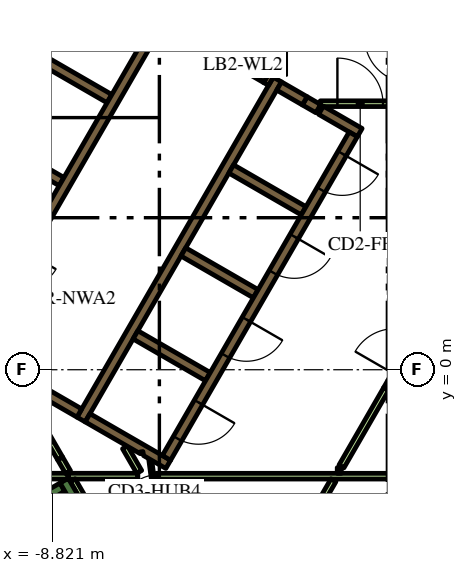
"""IFC4 building model, lengths in metres.
Left out: names, types, materials, properties, quantities, classifications, styles, units other than length and angle.
Written with IfcOpenShell. Run it as: python <this file> out.ifc"""

import sys

from ifc_helpers import new_model, si_unit, direction, frame, frame_2d, origin, place, context, subcontext, project, spatial, polyline, rectangle, outline, extrude, element, fill, save


model = new_model("IFC4")
c1 = context("Model", 3, precision=1e-05, world=origin(), true_north=direction((0.0, 1.0)))
c2 = subcontext(c1, "Body", "Model", "MODEL_VIEW")
j1 = project(units=[si_unit("LENGTHUNIT", "METRE"), si_unit("PLANEANGLEUNIT", "RADIAN")], contexts=[c1])
p1 = place(None, origin())
s1 = spatial("IfcSite", under=j1, at=p1, CompositionType="ELEMENT")
p2 = place(p1, origin())
s2 = spatial("IfcBuilding", under=s1, at=p2, CompositionType="ELEMENT")
p3 = place(p2, frame((0.0, 0.0, 130.5)))
s3 = spatial("IfcBuildingStorey", under=s2, at=p3, CompositionType="ELEMENT", Elevation=130.5)
p4 = place(p3, frame((-14.268, 0.387, 0.0), z_axis=(0.0, 0.0, 1.0), x_axis=(0.499994617707, 0.866028511231, 0.0)))
e1 = element("IfcWall", 1, at=p4, inside=s3, PredefinedType="SOLIDWALL", context=c2, shape_type="SweptSolid", body=[
    extrude(rectangle(XDim=18.817, YDim=0.9, at=frame_2d((9.409, 0.0))), origin(), (0.0, 0.0, 1.0), 3.9),
])
p5 = place(p3, frame((-14.44, -6.49, 0.0), z_axis=(0.0, 0.0, 1.0), x_axis=(0.866022966069, 0.500004222222, 0.0)))
e2 = element("IfcWall", 2, at=p5, inside=s3, PredefinedType="SOLIDWALL", context=c2, shape_type="SweptSolid", body=[
    extrude(rectangle(XDim=6.8, YDim=0.25, at=frame_2d((3.4, 0.0))), origin(), (0.0, 0.0, 1.0), 3.9),
])
p6 = place(p3, frame((-8.163, -3.511, 0.0), z_axis=(0.0, 0.0, 1.0), x_axis=(-0.500206266495, 0.865906283012, 0.0)))
e3 = element("IfcWall", 3, at=p6, inside=s3, PredefinedType="SOLIDWALL", context=c2, shape_type="SweptSolid", body=[
    extrude(rectangle(XDim=0.684, YDim=0.25, at=frame_2d((0.342, 0.0))), origin(), (0.0, 0.0, 1.0), 3.9),
])
p7 = place(p3, frame((-8.06, -1.311, 0.0), z_axis=(0.0, 0.0, 1.0), x_axis=(0.50000273126, 0.866023826885, 0.0)))
e4 = element("IfcWall", 4, at=p7, inside=s3, PredefinedType="SOLIDWALL", context=c2, shape_type="SweptSolid", body=[
    extrude(rectangle(XDim=10.33, YDim=0.25, at=frame_2d((5.165, 0.0))), origin(), (0.0, 0.0, 1.0), 3.9),
])
p8 = place(p3, frame((-1.819, 6.87, 0.0), z_axis=(0.0, 0.0, 1.0), x_axis=(-0.866294599386, 0.499533449405, 0.0)))
e5 = element("IfcWall", 5, at=p8, inside=s3, PredefinedType="SOLIDWALL", context=c2, shape_type="SweptSolid", body=[
    extrude(rectangle(XDim=0.41, YDim=0.25, at=frame_2d((0.205, 0.0))), origin(), (0.0, 0.0, 1.0), 3.9),
])
p9 = place(p3, frame((-2.849, 7.465, 0.0), z_axis=(0.0, 0.0, 1.0), x_axis=(0.865955664968, -0.500120771724, 0.0)))
e6 = element("IfcWall", 6, at=p9, inside=s3, PredefinedType="SOLIDWALL", context=c2, shape_type="SweptSolid", body=[
    extrude(rectangle(XDim=0.778, YDim=0.25, at=frame_2d((0.389, 0.0))), origin(), (0.0, 0.0, 1.0), 3.9),
])
p10 = place(p3, frame((-0.728, 6.24, 0.0), z_axis=(0.0, 0.0, 1.0), x_axis=(-0.866002680491, 0.500039355833, 0.0)))
e7 = element("IfcWall", 7, at=p10, inside=s3, PredefinedType="SOLIDWALL", context=c2, shape_type="SweptSolid", body=[
    extrude(rectangle(XDim=1.178, YDim=0.25, at=frame_2d((0.589, 0.0))), origin(), (0.0, 0.0, 1.0), 3.9),
])
for number, where, z_axis, x_axis in (
    (8, (-2.204, 4.182, 0.0), (0.0, 0.0, 1.0), (-0.866, 0.5, 0.0)),
    (9, (-5.369, 3.1, 0.0), (0.0, 0.0, 1.0), (0.866, -0.5, 0.0)),
    (10, (-4.724, -0.182, 0.0), (0.0, 0.0, 1.0), (-0.866, 0.5, 0.0)),
):
    element("IfcWall", number, at=place(p3, frame(where, z_axis=z_axis, x_axis=x_axis)), inside=s3, PredefinedType="SOLIDWALL", context=c2, shape_type="SweptSolid", body=[
        extrude(rectangle(XDim=2.2, YDim=0.25, at=frame_2d((1.1, 0.0))), origin(), (0.0, 0.0, 1.0), 3.9),
    ])
p11 = place(p3, origin())
e11 = element("IfcWall", 11, at=p11, inside=s3, PredefinedType="SOLIDWALL", context=c2, shape_type="SweptSolid", body=[
    extrude(outline(polyline([(-5.922, -2.257), (-5.922, -2.257), (-5.705, -2.382), (-5.83, -2.598), (-6.418, -2.258), (-6.433, -2.153), (-6.433, -2.153), (-6.433, -2.153), (-6.508, -2.163), (-6.508, -2.163), (-6.508, -2.163), (-6.501, -2.21), (-7.952, -1.373), (-7.827, -1.156), (-5.922, -2.257)])), origin(), (0.0, 0.0, 1.0), 3.9),
])
p12 = place(p3, frame((-9.265, -0.471, 0.0), z_axis=(0.0, 0.0, 1.0), x_axis=(0.865954634268, -0.500122556369, 0.0)))
e12 = element("IfcWall", 12, at=p12, inside=s3, PredefinedType="SOLIDWALL", context=c2, shape_type="SweptSolid", body=[
    extrude(rectangle(XDim=1.338, YDim=0.25, at=frame_2d((0.669, 0.0))), origin(), (0.0, 0.0, 1.0), 3.9),
])
e13 = element("IfcWall", 13, at=p11, inside=s3, PredefinedType="SOLIDWALL", context=c2, shape_type="SweptSolid", body=[
    extrude(outline(polyline([(-3.128, 7.481), (-3.259, 7.557), (-3.134, 7.773), (-3.003, 7.698), (-3.128, 7.481)])), origin(), (0.0, 0.0, 1.0), 3.9),
])
for number, where, z_axis, x_axis in (
    (14, (-8.574, 4.95, 0.0), (0.0, 0.0, 1.0), (-0.866, 0.5, 0.0)),
    (15, (-7.314, 7.132, 0.0), (0.0, 0.0, 1.0), (-0.866, 0.5, 0.0)),
):
    element("IfcWall", number, at=place(p3, frame(where, z_axis=z_axis, x_axis=x_axis)), inside=s3, PredefinedType="SOLIDWALL", context=c2, shape_type="SweptSolid", body=[
        extrude(rectangle(XDim=2.2, YDim=0.25, at=frame_2d((1.1, 0.0))), origin(), (0.0, 0.0, 1.0), 3.9),
    ])
p13 = place(p3, frame((-7.959, 10.415, 0.0), z_axis=(0.0, 0.0, 1.0), x_axis=(0.866020958405, -0.500007699544, 0.0)))
e16 = element("IfcWall", 16, at=p13, inside=s3, PredefinedType="SOLIDWALL", context=c2, shape_type="SweptSolid", body=[
    extrude(rectangle(XDim=4.1, YDim=0.25, at=frame_2d((2.05, 0.0))), origin(), (0.0, 0.0, 1.0), 3.9),
])
p14 = place(p3, frame((-8.395, -2.8, 0.0), z_axis=(0.0, 0.0, 1.0), x_axis=(1.0, 0.0, 0.0)))
e17 = element("IfcWall", 17, at=p14, inside=s3, PredefinedType="PARTITIONING", context=c2, shape_type="SweptSolid", body=[
    extrude(rectangle(XDim=1.828, YDim=0.15, at=frame_2d((0.914, 0.0))), origin(), (0.0, 0.0, 1.0), 2.6),
])
p15 = place(p3, frame((-11.115, -2.8, 0.0), z_axis=(0.0, 0.0, 1.0), x_axis=(1.0, 0.0, 0.0)))
e18 = element("IfcWall", 18, at=p15, inside=s3, PredefinedType="PARTITIONING", context=c2, shape_type="SweptSolid", body=[
    extrude(rectangle(XDim=2.708, YDim=0.15, at=frame_2d((1.354, 0.0))), origin(), (0.0, 0.0, 1.0), 2.6),
])
p16 = place(p3, frame((-6.531, -2.689, 0.0), z_axis=(0.0, 0.0, 1.0), x_axis=(-0.499967446111, 0.866044197965, 0.0)))
e19 = element("IfcWall", 19, at=p16, inside=s3, PredefinedType="PARTITIONING", context=c2, shape_type="SweptSolid", body=[
    extrude(rectangle(XDim=0.748, YDim=0.15, at=frame_2d((0.374, 0.0))), origin(), (0.0, 0.0, 1.0), 2.6),
])
p17 = place(p3, frame((-7.99, -3.412, 0.0), z_axis=(0.0, 0.0, 1.0), x_axis=(-0.500193841991, 0.86591346013, 0.0)))
e20 = element("IfcWall", 20, at=p17, inside=s3, PredefinedType="PARTITIONING", context=c2, shape_type="SweptSolid", body=[
    extrude(rectangle(XDim=0.583, YDim=0.15, at=frame_2d((0.292, 0.0))), origin(), (0.0, 0.0, 1.0), 2.6),
])
p18 = place(p3, frame((-8.612, -2.333, 0.0), z_axis=(0.0, 0.0, 1.0), x_axis=(0.500248216681, -0.86588204838, 0.0)))
e21 = element("IfcWall", 21, at=p18, inside=s3, PredefinedType="PARTITIONING", context=c2, shape_type="SweptSolid", body=[
    extrude(rectangle(XDim=0.415, YDim=0.15, at=frame_2d((0.208, 0.0))), origin(), (0.0, 0.0, 1.0), 2.6),
])
p19 = place(p3, frame((-6.086, -2.801, 0.0), z_axis=(0.0, 0.0, 1.0), x_axis=(1.0, 0.0, 0.0)))
e22 = element("IfcWall", 22, at=p19, inside=s3, PredefinedType="PARTITIONING", context=c2, shape_type="SweptSolid", body=[
    extrude(rectangle(XDim=7.524, YDim=0.15, at=frame_2d((3.762, 0.0))), origin(), (0.0, 0.0, 1.0), 2.6),
])
p20 = place(p3, frame((-1.887, -3.718, 0.0), z_axis=(0.0, 0.0, 1.0), x_axis=(0.499842898591, 0.866116087328, 0.0)))
e23 = element("IfcWall", 23, at=p20, inside=s3, PredefinedType="PARTITIONING", context=c2, shape_type="SweptSolid", body=[
    extrude(rectangle(XDim=0.936, YDim=0.15, at=frame_2d((0.468, 0.0))), origin(), (0.0, 0.0, 1.0), 2.6),
])
p21 = place(p3, frame((-1.212, -2.651, 0.0), z_axis=(0.0, 0.0, 1.0), x_axis=(-1.0, 0.0, 0.0)))
e24 = element("IfcWall", 24, at=p21, inside=s3, PredefinedType="PARTITIONING", context=c2, shape_type="SweptSolid", body=[
    extrude(rectangle(XDim=0.108, YDim=0.15, at=frame_2d((0.054, 0.0))), origin(), (0.0, 0.0, 1.0), 2.6),
])
p22 = place(p3, frame((-1.208, -2.544, 0.0), z_axis=(0.0, 0.0, 1.0), x_axis=(0.499995339376, 0.86602809458, 0.0)))
e25 = element("IfcWall", 25, at=p22, inside=s3, PredefinedType="PARTITIONING", context=c2, shape_type="SweptSolid", body=[
    extrude(rectangle(XDim=2.349, YDim=0.15, at=frame_2d((1.175, 0.0))), origin(), (0.0, 0.0, 1.0), 2.6),
])
p23 = place(p3, frame((-6.008, 9.144, 0.0), z_axis=(0.0, 0.0, 1.0), x_axis=(-0.500006956611, -0.866021387346, 0.0)))
e26 = element("IfcWall", 26, at=p23, inside=s3, PredefinedType="SOLIDWALL", context=c2, shape_type="SweptSolid", body=[
    extrude(rectangle(XDim=9.83, YDim=0.25, at=frame_2d((4.915, 0.0))), origin(), (0.0, 0.0, 1.0), 3.9),
])
p24 = place(p23, frame((6.985, 0.0, 0.0)))
e27 = element("IfcOpeningElement", 27, at=p24, cuts=e26, PredefinedType="OPENING", context=c2, shape_type="SweptSolid", body=[
    extrude(rectangle(XDim=0.9, YDim=2.1, at=frame_2d((0.45, 1.05))), frame((0.0, 0.135, 0.0), z_axis=(0.0, -1.0, 0.0), x_axis=(1.0, 0.0, 0.0)), (0.0, 0.0, 1.0), 0.27),
])
p25 = place(p3, frame((-0.898, 6.194, 0.0), z_axis=(0.0, 0.0, 1.0), x_axis=(-0.499996202215, -0.866027596426, 0.0)))
e28 = element("IfcWall", 28, at=p25, inside=s3, PredefinedType="SOLIDWALL", context=c2, shape_type="SweptSolid", body=[
    extrude(rectangle(XDim=9.83, YDim=0.25, at=frame_2d((4.915, 0.0))), origin(), (0.0, 0.0, 1.0), 3.9),
])
p26 = place(p25, frame((0.585, 0.0, 0.0)))
e29 = element("IfcOpeningElement", 29, at=p26, cuts=e28, PredefinedType="OPENING", context=c2, shape_type="SweptSolid", body=[
    extrude(rectangle(XDim=1.1, YDim=2.1, at=frame_2d((0.55, 1.05))), frame((0.0, 0.135, 0.0), z_axis=(0.0, -1.0, 0.0), x_axis=(1.0, 0.0, 0.0)), (0.0, 0.0, 1.0), 0.27),
])
p27 = place(p25, frame((3.105, 0.0, 0.0)))
e30 = element("IfcOpeningElement", 30, at=p27, cuts=e28, PredefinedType="OPENING", context=c2, shape_type="SweptSolid", body=[
    extrude(rectangle(XDim=1.1, YDim=2.1, at=frame_2d((0.55, 1.05))), frame((0.0, 0.135, 0.0), z_axis=(0.0, -1.0, 0.0), x_axis=(1.0, 0.0, 0.0)), (0.0, 0.0, 1.0), 0.27),
])
p28 = place(p25, frame((5.625, 0.0, 0.0)))
e31 = element("IfcOpeningElement", 31, at=p28, cuts=e28, PredefinedType="OPENING", context=c2, shape_type="SweptSolid", body=[
    extrude(rectangle(XDim=1.1, YDim=2.1, at=frame_2d((0.55, 1.05))), frame((0.0, 0.135, 0.0), z_axis=(0.0, -1.0, 0.0), x_axis=(1.0, 0.0, 0.0)), (0.0, 0.0, 1.0), 0.27),
])
p29 = place(p25, frame((8.145, 0.0, 0.0)))
e32 = element("IfcOpeningElement", 32, at=p29, cuts=e28, PredefinedType="OPENING", context=c2, shape_type="SweptSolid", body=[
    extrude(rectangle(XDim=1.1, YDim=2.1, at=frame_2d((0.55, 1.05))), frame((0.0, 0.135, 0.0), z_axis=(0.0, -1.0, 0.0), x_axis=(1.0, 0.0, 0.0)), (0.0, 0.0, 1.0), 0.27),
])
p30 = place(p3, frame((-1.765, 7.0, 0.0), z_axis=(0.0, 0.0, 1.0), x_axis=(1.0, 0.0, 0.0)))
e33 = element("IfcWall", 33, at=p30, inside=s3, PredefinedType="PARTITIONING", context=c2, shape_type="SweptSolid", body=[
    extrude(rectangle(XDim=2.1, YDim=0.15, at=frame_2d((1.05, 0.0))), origin(), (0.0, 0.0, 1.0), 2.6),
])
p31 = place(p30, frame((0.45, 0.0, 0.0)))
e34 = element("IfcOpeningElement", 34, at=p31, cuts=e33, PredefinedType="OPENING", context=c2, shape_type="SweptSolid", body=[
    extrude(rectangle(XDim=1.2, YDim=2.1, at=frame_2d((0.6, 1.05))), frame((0.0, 0.085, 0.0), z_axis=(0.0, -1.0, 0.0), x_axis=(1.0, 0.0, 0.0)), (0.0, 0.0, 1.0), 0.17),
])
p32 = place(p3, frame((-0.034, -0.509, 0.0), z_axis=(0.0, 0.0, 1.0), x_axis=(0.49994051562, 0.866059744384, 0.0)))
e35 = element("IfcWall", 35, at=p32, inside=s3, PredefinedType="PARTITIONING", context=c2, shape_type="SweptSolid", body=[
    extrude(rectangle(XDim=2.1, YDim=0.15, at=frame_2d((1.05, 0.0))), origin(), (0.0, 0.0, 1.0), 2.6),
])
p33 = place(p32, frame((0.45, 0.0, 0.0)))
e36 = element("IfcOpeningElement", 36, at=p33, cuts=e35, PredefinedType="OPENING", context=c2, shape_type="SweptSolid", body=[
    extrude(rectangle(XDim=1.2, YDim=2.1, at=frame_2d((0.6, 1.05))), frame((0.0, 0.085, 0.0), z_axis=(0.0, -1.0, 0.0), x_axis=(1.0, 0.0, 0.0)), (0.0, 0.0, 1.0), 0.17),
])
p34 = place(p3, frame((-5.995, -4.213, 0.0), z_axis=(0.0, 0.0, 1.0), x_axis=(-0.132072335448, 0.991240081014, 0.0)))
e37 = element("IfcWall", 37, at=p34, inside=s3, PredefinedType="PARTITIONING", context=c2, shape_type="SweptSolid", body=[
    extrude(rectangle(XDim=2.1, YDim=0.076, at=frame_2d((1.05, 0.0))), origin(), (0.0, 0.0, 1.0), 2.6),
])
p35 = place(p34, frame((0.55, 0.0, 0.0)))
e38 = element("IfcOpeningElement", 38, at=p35, cuts=e37, PredefinedType="OPENING", context=c2, shape_type="SweptSolid", body=[
    extrude(rectangle(XDim=0.9, YDim=2.1, at=frame_2d((0.45, 1.05))), frame((0.0, 0.048, 0.0), z_axis=(0.0, -1.0, 0.0), x_axis=(1.0, 0.0, 0.0)), (0.0, 0.0, 1.0), 0.096),
])
p36 = place(p3, frame((-4.409, 8.365, 0.0), z_axis=(0.0, 0.0, 1.0), x_axis=(0.866034573852, -0.49998411664, 0.0)))
e39 = element("IfcWall", 39, at=p36, inside=s3, PredefinedType="SOLIDWALL", context=c2, shape_type="SweptSolid", body=[
    extrude(rectangle(XDim=1.4, YDim=0.25, at=frame_2d((0.7, 0.0))), origin(), (0.0, 0.0, 1.0), 3.9),
])
p37 = place(p36, frame((0.1, 0.0, 0.0)))
e40 = element("IfcOpeningElement", 40, at=p37, cuts=e39, PredefinedType="OPENING", context=c2, shape_type="SweptSolid", body=[
    extrude(rectangle(XDim=1.2, YDim=2.1, at=frame_2d((0.6, 1.05))), frame((0.0, 0.135, 0.0), z_axis=(0.0, -1.0, 0.0), x_axis=(1.0, 0.0, 0.0)), (0.0, 0.0, 1.0), 0.27),
])
p38 = place(p3, frame((-8.612, -2.333, 0.0), z_axis=(0.0, 0.0, 1.0), x_axis=(-0.499961193289, 0.866047807691, 0.0)))
e41 = element("IfcWall", 41, at=p38, inside=s3, PredefinedType="PARTITIONING", context=c2, shape_type="SweptSolid", body=[
    extrude(rectangle(XDim=1.8, YDim=0.15, at=frame_2d((0.9, 0.0))), origin(), (0.0, 0.0, 1.0), 2.6),
])
p39 = place(p38, frame((0.45, 0.0, 0.0)))
e42 = element("IfcOpeningElement", 42, at=p39, cuts=e41, PredefinedType="OPENING", context=c2, shape_type="SweptSolid", body=[
    extrude(rectangle(XDim=0.9, YDim=2.1, at=frame_2d((0.45, 1.05))), frame((0.0, 0.085, 0.0), z_axis=(0.0, -1.0, 0.0), x_axis=(1.0, 0.0, 0.0)), (0.0, 0.0, 1.0), 0.17),
])
p40 = place(p3, frame((-19.081, -3.9, 0.0), z_axis=(0.0, 0.0, 1.0), x_axis=(0.499998313975, 0.866026377209, 0.0)))
e43 = element("IfcWall", 43, at=p40, inside=s3, PredefinedType="PARTITIONING", context=c2, shape_type="SweptSolid", body=[
    extrude(rectangle(XDim=25.766, YDim=0.15, at=frame_2d((12.883, 0.0))), origin(), (0.0, 0.0, 1.0), 2.6),
])
p41 = place(p40, frame((24.141, 0.0, 0.0)))
e44 = element("IfcOpeningElement", 44, at=p41, cuts=e43, PredefinedType="OPENING", context=c2, shape_type="SweptSolid", body=[
    extrude(rectangle(XDim=1.1, YDim=2.1, at=frame_2d((0.55, 1.05))), frame((0.0, 0.085, 0.0), z_axis=(0.0, -1.0, 0.0), x_axis=(1.0, 0.0, 0.0)), (0.0, 0.0, 1.0), 0.17),
])
p42 = place(p40, frame((13.144, 0.0, 0.0)))
e45 = element("IfcOpeningElement", 45, at=p42, cuts=e43, PredefinedType="OPENING", context=c2, shape_type="SweptSolid", body=[
    extrude(rectangle(XDim=1.0, YDim=2.1, at=frame_2d((0.5, 1.05))), frame((0.0, 0.085, 0.0), z_axis=(0.0, -1.0, 0.0), x_axis=(1.0, 0.0, 0.0)), (0.0, 0.0, 1.0), 0.17),
])
p43 = place(p40, frame((11.593, 0.0, 0.0)))
e46 = element("IfcOpeningElement", 46, at=p43, cuts=e43, PredefinedType="OPENING", context=c2, shape_type="SweptSolid", body=[
    extrude(rectangle(XDim=1.1, YDim=2.1, at=frame_2d((0.55, 1.05))), frame((0.0, 0.085, 0.0), z_axis=(0.0, -1.0, 0.0), x_axis=(1.0, 0.0, 0.0)), (0.0, 0.0, 1.0), 0.17),
])
p44 = place(p40, frame((0.596, 0.0, 0.0)))
e47 = element("IfcOpeningElement", 47, at=p44, cuts=e43, PredefinedType="OPENING", context=c2, shape_type="SweptSolid", body=[
    extrude(rectangle(XDim=1.0, YDim=2.1, at=frame_2d((0.5, 1.05))), frame((0.0, 0.085, 0.0), z_axis=(0.0, -1.0, 0.0), x_axis=(1.0, 0.0, 0.0)), (0.0, 0.0, 1.0), 0.17),
])
p45 = place(p26, origin())
e48 = element("IfcDoor", 48, at=p45, inside=s3, OperationType="DOUBLE_DOOR_SLIDING", PredefinedType="DOOR", context=c2, shape_type="SweptSolid", body=[
    extrude(rectangle(XDim=1.1, YDim=2.1, at=frame_2d((0.55, 1.05))), frame((0.0, 0.025, 0.0), z_axis=(0.0, -1.0, 0.0), x_axis=(1.0, 0.0, 0.0)), (0.0, 0.0, 1.0), 0.05),
])
fill(e29, e48)
p46 = place(p27, origin())
e49 = element("IfcDoor", 49, at=p46, inside=s3, OperationType="DOUBLE_DOOR_SLIDING", PredefinedType="DOOR", context=c2, shape_type="SweptSolid", body=[
    extrude(rectangle(XDim=1.1, YDim=2.1, at=frame_2d((0.55, 1.05))), frame((0.0, 0.025, 0.0), z_axis=(0.0, -1.0, 0.0), x_axis=(1.0, 0.0, 0.0)), (0.0, 0.0, 1.0), 0.05),
])
fill(e30, e49)
p47 = place(p28, origin())
e50 = element("IfcDoor", 50, at=p47, inside=s3, OperationType="DOUBLE_DOOR_SLIDING", PredefinedType="DOOR", context=c2, shape_type="SweptSolid", body=[
    extrude(rectangle(XDim=1.1, YDim=2.1, at=frame_2d((0.55, 1.05))), frame((0.0, 0.025, 0.0), z_axis=(0.0, -1.0, 0.0), x_axis=(1.0, 0.0, 0.0)), (0.0, 0.0, 1.0), 0.05),
])
fill(e31, e50)
p48 = place(p29, origin())
e51 = element("IfcDoor", 51, at=p48, inside=s3, OperationType="DOUBLE_DOOR_SLIDING", PredefinedType="DOOR", context=c2, shape_type="SweptSolid", body=[
    extrude(rectangle(XDim=1.1, YDim=2.1, at=frame_2d((0.55, 1.05))), frame((0.0, 0.025, 0.0), z_axis=(0.0, -1.0, 0.0), x_axis=(1.0, 0.0, 0.0)), (0.0, 0.0, 1.0), 0.05),
])
fill(e32, e51)
p49 = place(p31, origin())
e52 = element("IfcDoor", 52, at=p49, inside=s3, OperationType="SINGLE_SWING_LEFT", PredefinedType="DOOR", context=c2, shape_type="SweptSolid", body=[
    extrude(rectangle(XDim=1.2, YDim=2.1, at=frame_2d((0.6, 1.05))), frame((0.0, 0.025, 0.0), z_axis=(0.0, -1.0, 0.0), x_axis=(1.0, 0.0, 0.0)), (0.0, 0.0, 1.0), 0.05),
])
fill(e34, e52)
p50 = place(p35, origin())
e53 = element("IfcDoor", 53, at=p50, inside=s3, OperationType="SINGLE_SWING_LEFT", PredefinedType="DOOR", context=c2, shape_type="SweptSolid", body=[
    extrude(rectangle(XDim=0.9, YDim=2.1, at=frame_2d((0.45, 1.05))), frame((0.0, 0.025, 0.0), z_axis=(0.0, -1.0, 0.0), x_axis=(1.0, 0.0, 0.0)), (0.0, 0.0, 1.0), 0.05),
])
fill(e38, e53)
p51 = place(p37, origin())
e54 = element("IfcDoor", 54, at=p51, inside=s3, OperationType="SINGLE_SWING_LEFT", PredefinedType="DOOR", context=c2, shape_type="SweptSolid", body=[
    extrude(rectangle(XDim=1.2, YDim=2.1, at=frame_2d((0.6, 1.05))), frame((0.0, 0.025, 0.0), z_axis=(0.0, -1.0, 0.0), x_axis=(1.0, 0.0, 0.0)), (0.0, 0.0, 1.0), 0.05),
])
fill(e40, e54)
p52 = place(p39, origin())
e55 = element("IfcDoor", 55, at=p52, inside=s3, OperationType="SINGLE_SWING_LEFT", PredefinedType="DOOR", context=c2, shape_type="SweptSolid", body=[
    extrude(rectangle(XDim=0.9, YDim=2.1, at=frame_2d((0.45, 1.05))), frame((0.0, 0.025, 0.0), z_axis=(0.0, -1.0, 0.0), x_axis=(1.0, 0.0, 0.0)), (0.0, 0.0, 1.0), 0.05),
])
fill(e42, e55)
save(model, sys.argv[1])
